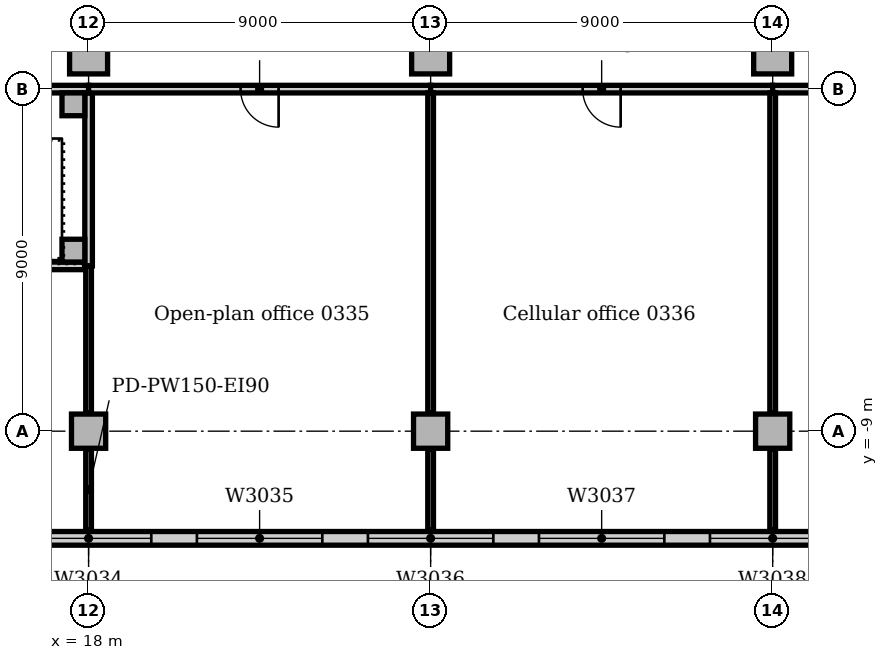
"""IFC4 building model, lengths in metres.
Left out: names, types, materials, properties, quantities, classifications, styles, units other than length and angle.
Written with IfcOpenShell. Run it as: python <this file> out.ifc"""

import sys

from ifc_helpers import new_model, si_unit, direction, frame, frame_2d, origin, origin_2d, place, context, subcontext, project, spatial, rectangle, extrude, element, fill, save


model = new_model("IFC4")
c1 = context("Model", 3, precision=1e-05, world=origin(), true_north=direction((0.0, 1.0)))
c2 = subcontext(c1, "Body", "Model", "MODEL_VIEW")
j1 = project(units=[si_unit("LENGTHUNIT", "METRE"), si_unit("PLANEANGLEUNIT", "RADIAN")], contexts=[c1])
p1 = place(None, origin())
s1 = spatial("IfcSite", under=j1, at=p1, CompositionType="ELEMENT")
p2 = place(p1, origin())
s2 = spatial("IfcBuilding", under=s1, at=p2, CompositionType="ELEMENT")
p3 = place(p2, frame((0.0, 0.0, 16.0)))
s3 = spatial("IfcBuildingStorey", under=s2, at=p3, CompositionType="ELEMENT", Elevation=16.0)
for number, where, z_axis, x_axis in (
    (1, (18.0, 0.9, 0.0), (0.0, 0.0, 1.0), (1.0, 0.0, 0.0)),
    (2, (27.0, 0.9, 0.0), (0.0, 0.0, 1.0), (1.0, 0.0, 0.0)),
    (3, (36.0, 0.9, 0.0), (0.0, 0.0, 1.0), (1.0, 0.0, 0.0)),
):
    element("IfcColumn", number, at=place(p3, frame(where, z_axis=z_axis, x_axis=x_axis)), inside=s3, PredefinedType="COLUMN", context=c2, shape_type="SweptSolid", body=[
        extrude(rectangle(XDim=1.0, YDim=1.0, at=origin_2d()), origin(), (0.0, 0.0, 1.0), 4.7),
    ])
for number, where, z_axis, x_axis in (
    (4, (18.0, -9.0, 0.0), (0.0, 0.0, 1.0), (1.0, 0.0, 0.0)),
    (5, (27.0, -9.0, 0.0), (0.0, 0.0, 1.0), (1.0, 0.0, 0.0)),
    (6, (36.0, -9.0, 0.0), (0.0, 0.0, 1.0), (1.0, 0.0, 0.0)),
):
    element("IfcColumn", number, at=place(p3, frame(where, z_axis=z_axis, x_axis=x_axis)), inside=s3, PredefinedType="COLUMN", context=c2, shape_type="SweptSolid", body=[
        extrude(rectangle(XDim=0.9, YDim=0.9, at=origin_2d()), origin(), (0.0, 0.0, 1.0), 4.7),
    ])
p4 = place(p3, frame((-81.0, -11.82, 0.0), z_axis=(0.0, 0.0, 1.0), x_axis=(1.0, 0.0, 0.0)))
e7 = element("IfcWall", 7, at=p4, inside=s3, PredefinedType="STANDARD", context=c2, shape_type="SweptSolid", body=[
    extrude(rectangle(XDim=144.0, YDim=0.36, at=frame_2d((72.0, 0.0))), origin(), (0.0, 0.0, 1.0), 4.7),
])
p5 = place(p4, frame((2.85, 0.0, 0.9)))
e8 = element("IfcOpeningElement", 8, at=p5, cuts=e7, PredefinedType="OPENING", context=c2, shape_type="SweptSolid", body=[
    extrude(rectangle(XDim=3.3, YDim=2.4, at=frame_2d((1.65, 1.2))), frame((0.0, 0.19, 0.0), z_axis=(0.0, -1.0, 0.0), x_axis=(1.0, 0.0, 0.0)), (0.0, 0.0, 1.0), 0.38),
])
p6 = place(p4, frame((7.35, 0.0, 0.9)))
e9 = element("IfcOpeningElement", 9, at=p6, cuts=e7, PredefinedType="OPENING", context=c2, shape_type="SweptSolid", body=[
    extrude(rectangle(XDim=3.3, YDim=2.4, at=frame_2d((1.65, 1.2))), frame((0.0, 0.19, 0.0), z_axis=(0.0, -1.0, 0.0), x_axis=(1.0, 0.0, 0.0)), (0.0, 0.0, 1.0), 0.38),
])
p7 = place(p4, frame((11.85, 0.0, 0.9)))
e10 = element("IfcOpeningElement", 10, at=p7, cuts=e7, PredefinedType="OPENING", context=c2, shape_type="SweptSolid", body=[
    extrude(rectangle(XDim=3.3, YDim=2.4, at=frame_2d((1.65, 1.2))), frame((0.0, 0.19, 0.0), z_axis=(0.0, -1.0, 0.0), x_axis=(1.0, 0.0, 0.0)), (0.0, 0.0, 1.0), 0.38),
])
p8 = place(p4, frame((16.35, 0.0, 0.9)))
e11 = element("IfcOpeningElement", 11, at=p8, cuts=e7, PredefinedType="OPENING", context=c2, shape_type="SweptSolid", body=[
    extrude(rectangle(XDim=3.3, YDim=2.4, at=frame_2d((1.65, 1.2))), frame((0.0, 0.19, 0.0), z_axis=(0.0, -1.0, 0.0), x_axis=(1.0, 0.0, 0.0)), (0.0, 0.0, 1.0), 0.38),
])
p9 = place(p4, frame((20.85, 0.0, 0.9)))
e12 = element("IfcOpeningElement", 12, at=p9, cuts=e7, PredefinedType="OPENING", context=c2, shape_type="SweptSolid", body=[
    extrude(rectangle(XDim=3.3, YDim=2.4, at=frame_2d((1.65, 1.2))), frame((0.0, 0.19, 0.0), z_axis=(0.0, -1.0, 0.0), x_axis=(1.0, 0.0, 0.0)), (0.0, 0.0, 1.0), 0.38),
])
p10 = place(p4, frame((25.35, 0.0, 0.9)))
e13 = element("IfcOpeningElement", 13, at=p10, cuts=e7, PredefinedType="OPENING", context=c2, shape_type="SweptSolid", body=[
    extrude(rectangle(XDim=3.3, YDim=2.4, at=frame_2d((1.65, 1.2))), frame((0.0, 0.19, 0.0), z_axis=(0.0, -1.0, 0.0), x_axis=(1.0, 0.0, 0.0)), (0.0, 0.0, 1.0), 0.38),
])
p11 = place(p4, frame((29.85, 0.0, 0.9)))
e14 = element("IfcOpeningElement", 14, at=p11, cuts=e7, PredefinedType="OPENING", context=c2, shape_type="SweptSolid", body=[
    extrude(rectangle(XDim=3.3, YDim=2.4, at=frame_2d((1.65, 1.2))), frame((0.0, 0.19, 0.0), z_axis=(0.0, -1.0, 0.0), x_axis=(1.0, 0.0, 0.0)), (0.0, 0.0, 1.0), 0.38),
])
p12 = place(p4, frame((34.35, 0.0, 0.9)))
e15 = element("IfcOpeningElement", 15, at=p12, cuts=e7, PredefinedType="OPENING", context=c2, shape_type="SweptSolid", body=[
    extrude(rectangle(XDim=3.3, YDim=2.4, at=frame_2d((1.65, 1.2))), frame((0.0, 0.19, 0.0), z_axis=(0.0, -1.0, 0.0), x_axis=(1.0, 0.0, 0.0)), (0.0, 0.0, 1.0), 0.38),
])
p13 = place(p4, frame((38.85, 0.0, 0.9)))
e16 = element("IfcOpeningElement", 16, at=p13, cuts=e7, PredefinedType="OPENING", context=c2, shape_type="SweptSolid", body=[
    extrude(rectangle(XDim=3.3, YDim=2.4, at=frame_2d((1.65, 1.2))), frame((0.0, 0.19, 0.0), z_axis=(0.0, -1.0, 0.0), x_axis=(1.0, 0.0, 0.0)), (0.0, 0.0, 1.0), 0.38),
])
p14 = place(p4, frame((43.35, 0.0, 0.9)))
e17 = element("IfcOpeningElement", 17, at=p14, cuts=e7, PredefinedType="OPENING", context=c2, shape_type="SweptSolid", body=[
    extrude(rectangle(XDim=3.3, YDim=2.4, at=frame_2d((1.65, 1.2))), frame((0.0, 0.19, 0.0), z_axis=(0.0, -1.0, 0.0), x_axis=(1.0, 0.0, 0.0)), (0.0, 0.0, 1.0), 0.38),
])
p15 = place(p4, frame((47.85, 0.0, 0.9)))
e18 = element("IfcOpeningElement", 18, at=p15, cuts=e7, PredefinedType="OPENING", context=c2, shape_type="SweptSolid", body=[
    extrude(rectangle(XDim=3.3, YDim=2.4, at=frame_2d((1.65, 1.2))), frame((0.0, 0.19, 0.0), z_axis=(0.0, -1.0, 0.0), x_axis=(1.0, 0.0, 0.0)), (0.0, 0.0, 1.0), 0.38),
])
p16 = place(p4, frame((52.35, 0.0, 0.9)))
e19 = element("IfcOpeningElement", 19, at=p16, cuts=e7, PredefinedType="OPENING", context=c2, shape_type="SweptSolid", body=[
    extrude(rectangle(XDim=3.3, YDim=2.4, at=frame_2d((1.65, 1.2))), frame((0.0, 0.19, 0.0), z_axis=(0.0, -1.0, 0.0), x_axis=(1.0, 0.0, 0.0)), (0.0, 0.0, 1.0), 0.38),
])
p17 = place(p4, frame((56.85, 0.0, 0.9)))
e20 = element("IfcOpeningElement", 20, at=p17, cuts=e7, PredefinedType="OPENING", context=c2, shape_type="SweptSolid", body=[
    extrude(rectangle(XDim=3.3, YDim=2.4, at=frame_2d((1.65, 1.2))), frame((0.0, 0.19, 0.0), z_axis=(0.0, -1.0, 0.0), x_axis=(1.0, 0.0, 0.0)), (0.0, 0.0, 1.0), 0.38),
])
p18 = place(p4, frame((61.35, 0.0, 0.9)))
e21 = element("IfcOpeningElement", 21, at=p18, cuts=e7, PredefinedType="OPENING", context=c2, shape_type="SweptSolid", body=[
    extrude(rectangle(XDim=3.3, YDim=2.4, at=frame_2d((1.65, 1.2))), frame((0.0, 0.19, 0.0), z_axis=(0.0, -1.0, 0.0), x_axis=(1.0, 0.0, 0.0)), (0.0, 0.0, 1.0), 0.38),
])
p19 = place(p4, frame((65.85, 0.0, 0.9)))
e22 = element("IfcOpeningElement", 22, at=p19, cuts=e7, PredefinedType="OPENING", context=c2, shape_type="SweptSolid", body=[
    extrude(rectangle(XDim=3.3, YDim=2.4, at=frame_2d((1.65, 1.2))), frame((0.0, 0.19, 0.0), z_axis=(0.0, -1.0, 0.0), x_axis=(1.0, 0.0, 0.0)), (0.0, 0.0, 1.0), 0.38),
])
p20 = place(p4, frame((70.35, 0.0, 0.9)))
e23 = element("IfcOpeningElement", 23, at=p20, cuts=e7, PredefinedType="OPENING", context=c2, shape_type="SweptSolid", body=[
    extrude(rectangle(XDim=3.3, YDim=2.4, at=frame_2d((1.65, 1.2))), frame((0.0, 0.19, 0.0), z_axis=(0.0, -1.0, 0.0), x_axis=(1.0, 0.0, 0.0)), (0.0, 0.0, 1.0), 0.38),
])
p21 = place(p4, frame((74.85, 0.0, 0.9)))
e24 = element("IfcOpeningElement", 24, at=p21, cuts=e7, PredefinedType="OPENING", context=c2, shape_type="SweptSolid", body=[
    extrude(rectangle(XDim=3.3, YDim=2.4, at=frame_2d((1.65, 1.2))), frame((0.0, 0.19, 0.0), z_axis=(0.0, -1.0, 0.0), x_axis=(1.0, 0.0, 0.0)), (0.0, 0.0, 1.0), 0.38),
])
p22 = place(p4, frame((79.35, 0.0, 0.9)))
e25 = element("IfcOpeningElement", 25, at=p22, cuts=e7, PredefinedType="OPENING", context=c2, shape_type="SweptSolid", body=[
    extrude(rectangle(XDim=3.3, YDim=2.4, at=frame_2d((1.65, 1.2))), frame((0.0, 0.19, 0.0), z_axis=(0.0, -1.0, 0.0), x_axis=(1.0, 0.0, 0.0)), (0.0, 0.0, 1.0), 0.38),
])
p23 = place(p4, frame((83.85, 0.0, 0.9)))
e26 = element("IfcOpeningElement", 26, at=p23, cuts=e7, PredefinedType="OPENING", context=c2, shape_type="SweptSolid", body=[
    extrude(rectangle(XDim=3.3, YDim=2.4, at=frame_2d((1.65, 1.2))), frame((0.0, 0.19, 0.0), z_axis=(0.0, -1.0, 0.0), x_axis=(1.0, 0.0, 0.0)), (0.0, 0.0, 1.0), 0.38),
])
p24 = place(p4, frame((88.35, 0.0, 0.9)))
e27 = element("IfcOpeningElement", 27, at=p24, cuts=e7, PredefinedType="OPENING", context=c2, shape_type="SweptSolid", body=[
    extrude(rectangle(XDim=3.3, YDim=2.4, at=frame_2d((1.65, 1.2))), frame((0.0, 0.19, 0.0), z_axis=(0.0, -1.0, 0.0), x_axis=(1.0, 0.0, 0.0)), (0.0, 0.0, 1.0), 0.38),
])
p25 = place(p4, frame((92.85, 0.0, 0.9)))
e28 = element("IfcOpeningElement", 28, at=p25, cuts=e7, PredefinedType="OPENING", context=c2, shape_type="SweptSolid", body=[
    extrude(rectangle(XDim=3.3, YDim=2.4, at=frame_2d((1.65, 1.2))), frame((0.0, 0.19, 0.0), z_axis=(0.0, -1.0, 0.0), x_axis=(1.0, 0.0, 0.0)), (0.0, 0.0, 1.0), 0.38),
])
p26 = place(p4, frame((97.35, 0.0, 0.9)))
e29 = element("IfcOpeningElement", 29, at=p26, cuts=e7, PredefinedType="OPENING", context=c2, shape_type="SweptSolid", body=[
    extrude(rectangle(XDim=3.3, YDim=2.4, at=frame_2d((1.65, 1.2))), frame((0.0, 0.19, 0.0), z_axis=(0.0, -1.0, 0.0), x_axis=(1.0, 0.0, 0.0)), (0.0, 0.0, 1.0), 0.38),
])
p27 = place(p4, frame((101.85, 0.0, 0.9)))
e30 = element("IfcOpeningElement", 30, at=p27, cuts=e7, PredefinedType="OPENING", context=c2, shape_type="SweptSolid", body=[
    extrude(rectangle(XDim=3.3, YDim=2.4, at=frame_2d((1.65, 1.2))), frame((0.0, 0.19, 0.0), z_axis=(0.0, -1.0, 0.0), x_axis=(1.0, 0.0, 0.0)), (0.0, 0.0, 1.0), 0.38),
])
p28 = place(p4, frame((106.35, 0.0, 0.9)))
e31 = element("IfcOpeningElement", 31, at=p28, cuts=e7, PredefinedType="OPENING", context=c2, shape_type="SweptSolid", body=[
    extrude(rectangle(XDim=3.3, YDim=2.4, at=frame_2d((1.65, 1.2))), frame((0.0, 0.19, 0.0), z_axis=(0.0, -1.0, 0.0), x_axis=(1.0, 0.0, 0.0)), (0.0, 0.0, 1.0), 0.38),
])
p29 = place(p4, frame((110.85, 0.0, 0.9)))
e32 = element("IfcOpeningElement", 32, at=p29, cuts=e7, PredefinedType="OPENING", context=c2, shape_type="SweptSolid", body=[
    extrude(rectangle(XDim=3.3, YDim=2.4, at=frame_2d((1.65, 1.2))), frame((0.0, 0.19, 0.0), z_axis=(0.0, -1.0, 0.0), x_axis=(1.0, 0.0, 0.0)), (0.0, 0.0, 1.0), 0.38),
])
p30 = place(p4, frame((115.35, 0.0, 0.9)))
e33 = element("IfcOpeningElement", 33, at=p30, cuts=e7, PredefinedType="OPENING", context=c2, shape_type="SweptSolid", body=[
    extrude(rectangle(XDim=3.3, YDim=2.4, at=frame_2d((1.65, 1.2))), frame((0.0, 0.19, 0.0), z_axis=(0.0, -1.0, 0.0), x_axis=(1.0, 0.0, 0.0)), (0.0, 0.0, 1.0), 0.38),
])
p31 = place(p4, frame((119.85, 0.0, 0.9)))
e34 = element("IfcOpeningElement", 34, at=p31, cuts=e7, PredefinedType="OPENING", context=c2, shape_type="SweptSolid", body=[
    extrude(rectangle(XDim=3.3, YDim=2.4, at=frame_2d((1.65, 1.2))), frame((0.0, 0.19, 0.0), z_axis=(0.0, -1.0, 0.0), x_axis=(1.0, 0.0, 0.0)), (0.0, 0.0, 1.0), 0.38),
])
p32 = place(p4, frame((124.35, 0.0, 0.9)))
e35 = element("IfcOpeningElement", 35, at=p32, cuts=e7, PredefinedType="OPENING", context=c2, shape_type="SweptSolid", body=[
    extrude(rectangle(XDim=3.3, YDim=2.4, at=frame_2d((1.65, 1.2))), frame((0.0, 0.19, 0.0), z_axis=(0.0, -1.0, 0.0), x_axis=(1.0, 0.0, 0.0)), (0.0, 0.0, 1.0), 0.38),
])
p33 = place(p4, frame((128.85, 0.0, 0.9)))
e36 = element("IfcOpeningElement", 36, at=p33, cuts=e7, PredefinedType="OPENING", context=c2, shape_type="SweptSolid", body=[
    extrude(rectangle(XDim=3.3, YDim=2.4, at=frame_2d((1.65, 1.2))), frame((0.0, 0.19, 0.0), z_axis=(0.0, -1.0, 0.0), x_axis=(1.0, 0.0, 0.0)), (0.0, 0.0, 1.0), 0.38),
])
p34 = place(p4, frame((133.35, 0.0, 0.9)))
e37 = element("IfcOpeningElement", 37, at=p34, cuts=e7, PredefinedType="OPENING", context=c2, shape_type="SweptSolid", body=[
    extrude(rectangle(XDim=3.3, YDim=2.4, at=frame_2d((1.65, 1.2))), frame((0.0, 0.19, 0.0), z_axis=(0.0, -1.0, 0.0), x_axis=(1.0, 0.0, 0.0)), (0.0, 0.0, 1.0), 0.38),
])
p35 = place(p4, frame((137.85, 0.0, 0.9)))
e38 = element("IfcOpeningElement", 38, at=p35, cuts=e7, PredefinedType="OPENING", context=c2, shape_type="SweptSolid", body=[
    extrude(rectangle(XDim=3.3, YDim=2.4, at=frame_2d((1.65, 1.2))), frame((0.0, 0.19, 0.0), z_axis=(0.0, -1.0, 0.0), x_axis=(1.0, 0.0, 0.0)), (0.0, 0.0, 1.0), 0.38),
])
for number, where, z_axis, x_axis in (
    (39, (17.6, -4.25, 0.0), (0.0, 0.0, 1.0), (1.0, 0.0, 0.0)),
    (40, (17.6, -0.4, 0.0), (0.0, 0.0, 1.0), (1.0, 0.0, 0.0)),
):
    element("IfcColumn", number, at=place(p3, frame(where, z_axis=z_axis, x_axis=x_axis)), inside=s3, PredefinedType="COLUMN", context=c2, shape_type="SweptSolid", body=[
        extrude(rectangle(XDim=0.6, YDim=0.6, at=origin_2d()), origin(), (0.0, 0.0, 1.0), 5.0),
    ])
p36 = place(p3, frame((9.0, 0.0, 0.0), z_axis=(0.0, 0.0, 1.0), x_axis=(1.0, 0.0, 0.0)))
e41 = element("IfcWall", 41, at=p36, inside=s3, PredefinedType="SOLIDWALL", context=c2, shape_type="SweptSolid", body=[
    extrude(rectangle(XDim=9.0, YDim=0.2, at=frame_2d((4.5, 0.0))), origin(), (0.0, 0.0, 1.0), 4.7),
])
p37 = place(p36, frame((0.8, 0.0, 0.0)))
e42 = element("IfcOpeningElement", 42, at=p37, cuts=e41, PredefinedType="OPENING", context=c2, shape_type="SweptSolid", body=[
    extrude(rectangle(XDim=1.2, YDim=2.1, at=frame_2d((0.6, 1.05))), frame((0.0, 0.11, 0.0), z_axis=(0.0, -1.0, 0.0), x_axis=(1.0, 0.0, 0.0)), (0.0, 0.0, 1.0), 0.22),
])
p38 = place(p3, frame((8.9, -4.65, 0.0), z_axis=(0.0, 0.0, 1.0), x_axis=(1.0, 0.0, 0.0)))
e43 = element("IfcWall", 43, at=p38, inside=s3, PredefinedType="SOLIDWALL", context=c2, shape_type="SweptSolid", body=[
    extrude(rectangle(XDim=9.0, YDim=0.2, at=frame_2d((4.5, 0.0))), origin(), (0.0, 0.0, 1.0), 4.7),
])
p39 = place(p3, frame((18.0, -4.65, 0.0), z_axis=(0.0, 0.0, 1.0), x_axis=(0.0, 1.0, 0.0)))
e44 = element("IfcWall", 44, at=p39, inside=s3, PredefinedType="SOLIDWALL", context=c2, shape_type="SweptSolid", body=[
    extrude(rectangle(XDim=4.55, YDim=0.2, at=frame_2d((2.275, 0.0))), origin(), (0.0, 0.0, 1.0), 4.7),
])
p40 = place(p3, frame((18.0, 0.0, 0.0), z_axis=(0.0, 0.0, 1.0), x_axis=(1.0, 0.0, 0.0)))
e45 = element("IfcWall", 45, at=p40, inside=s3, PredefinedType="PARTITIONING", context=c2, shape_type="SweptSolid", body=[
    extrude(rectangle(XDim=9.0, YDim=0.2, at=frame_2d((4.5, 0.0))), origin(), (0.0, 0.0, 1.0), 4.7),
])
p41 = place(p40, frame((4.0, 0.0, 0.0)))
e46 = element("IfcOpeningElement", 46, at=p41, cuts=e45, PredefinedType="OPENING", context=c2, shape_type="SweptSolid", body=[
    extrude(rectangle(XDim=1.0, YDim=2.1, at=frame_2d((0.5, 1.05))), frame((0.0, 0.11, 0.0), z_axis=(0.0, -1.0, 0.0), x_axis=(1.0, 0.0, 0.0)), (0.0, 0.0, 1.0), 0.22),
])
p42 = place(p3, frame((27.0, 0.0, 0.0), z_axis=(0.0, 0.0, 1.0), x_axis=(1.0, 0.0, 0.0)))
e47 = element("IfcWall", 47, at=p42, inside=s3, PredefinedType="PARTITIONING", context=c2, shape_type="SweptSolid", body=[
    extrude(rectangle(XDim=9.0, YDim=0.2, at=frame_2d((4.5, 0.0))), origin(), (0.0, 0.0, 1.0), 4.7),
])
p43 = place(p42, frame((4.0, 0.0, 0.0)))
e48 = element("IfcOpeningElement", 48, at=p43, cuts=e47, PredefinedType="OPENING", context=c2, shape_type="SweptSolid", body=[
    extrude(rectangle(XDim=1.0, YDim=2.1, at=frame_2d((0.5, 1.05))), frame((0.0, 0.11, 0.0), z_axis=(0.0, -1.0, 0.0), x_axis=(1.0, 0.0, 0.0)), (0.0, 0.0, 1.0), 0.22),
])
p44 = place(p3, frame((36.0, 0.0, 0.0), z_axis=(0.0, 0.0, 1.0), x_axis=(1.0, 0.0, 0.0)))
e49 = element("IfcWall", 49, at=p44, inside=s3, PredefinedType="PARTITIONING", context=c2, shape_type="SweptSolid", body=[
    extrude(rectangle(XDim=9.0, YDim=0.2, at=frame_2d((4.5, 0.0))), origin(), (0.0, 0.0, 1.0), 4.7),
])
p45 = place(p44, frame((4.0, 0.0, 0.0)))
e50 = element("IfcOpeningElement", 50, at=p45, cuts=e49, PredefinedType="OPENING", context=c2, shape_type="SweptSolid", body=[
    extrude(rectangle(XDim=1.0, YDim=2.1, at=frame_2d((0.5, 1.05))), frame((0.0, 0.11, 0.0), z_axis=(0.0, -1.0, 0.0), x_axis=(1.0, 0.0, 0.0)), (0.0, 0.0, 1.0), 0.22),
])
p46 = place(p3, frame((18.0, -11.6, 0.0), z_axis=(0.0, 0.0, 1.0), x_axis=(0.0, 1.0, 0.0)))
e51 = element("IfcWall", 51, at=p46, inside=s3, PredefinedType="PARTITIONING", context=c2, shape_type="SweptSolid", body=[
    extrude(rectangle(XDim=2.13, YDim=0.15, at=frame_2d((1.065, 0.0))), origin(), (0.0, 0.0, 1.0), 4.7),
])
p47 = place(p3, frame((18.0, -8.53, 0.0), z_axis=(0.0, 0.0, 1.0), x_axis=(0.0, 1.0, 0.0)))
e52 = element("IfcWall", 52, at=p47, inside=s3, PredefinedType="PARTITIONING", context=c2, shape_type="SweptSolid", body=[
    extrude(rectangle(XDim=3.88, YDim=0.15, at=frame_2d((1.94, 0.0))), origin(), (0.0, 0.0, 1.0), 4.7),
])
p48 = place(p3, frame((27.0, -11.6, 0.0), z_axis=(0.0, 0.0, 1.0), x_axis=(0.0, 1.0, 0.0)))
e53 = element("IfcWall", 53, at=p48, inside=s3, PredefinedType="PARTITIONING", context=c2, shape_type="SweptSolid", body=[
    extrude(rectangle(XDim=2.13, YDim=0.15, at=frame_2d((1.065, 0.0))), origin(), (0.0, 0.0, 1.0), 4.7),
])
p49 = place(p3, frame((27.0, -8.53, 0.0), z_axis=(0.0, 0.0, 1.0), x_axis=(0.0, 1.0, 0.0)))
e54 = element("IfcWall", 54, at=p49, inside=s3, PredefinedType="PARTITIONING", context=c2, shape_type="SweptSolid", body=[
    extrude(rectangle(XDim=8.43, YDim=0.15, at=frame_2d((4.215, 0.0))), origin(), (0.0, 0.0, 1.0), 4.7),
])
p50 = place(p3, frame((36.0, -11.6, 0.0), z_axis=(0.0, 0.0, 1.0), x_axis=(0.0, 1.0, 0.0)))
e55 = element("IfcWall", 55, at=p50, inside=s3, PredefinedType="PARTITIONING", context=c2, shape_type="SweptSolid", body=[
    extrude(rectangle(XDim=2.13, YDim=0.15, at=frame_2d((1.065, 0.0))), origin(), (0.0, 0.0, 1.0), 4.7),
])
p51 = place(p3, frame((36.0, -8.53, 0.0), z_axis=(0.0, 0.0, 1.0), x_axis=(0.0, 1.0, 0.0)))
e56 = element("IfcWall", 56, at=p51, inside=s3, PredefinedType="PARTITIONING", context=c2, shape_type="SweptSolid", body=[
    extrude(rectangle(XDim=8.43, YDim=0.15, at=frame_2d((4.215, 0.0))), origin(), (0.0, 0.0, 1.0), 4.7),
])
p52 = place(p26, origin())
e57 = element("IfcWindow", 57, at=p52, inside=s3, PartitioningType="SINGLE_PANEL", PredefinedType="WINDOW", context=c2, shape_type="SweptSolid", body=[
    extrude(rectangle(XDim=3.3, YDim=2.4, at=frame_2d((1.65, 1.2))), frame((0.0, 0.13, 0.0), z_axis=(0.0, -1.0, 0.0), x_axis=(1.0, 0.0, 0.0)), (0.0, 0.0, 1.0), 0.06),
])
fill(e29, e57)
p53 = place(p27, origin())
e58 = element("IfcWindow", 58, at=p53, inside=s3, PartitioningType="SINGLE_PANEL", PredefinedType="WINDOW", context=c2, shape_type="SweptSolid", body=[
    extrude(rectangle(XDim=3.3, YDim=2.4, at=frame_2d((1.65, 1.2))), frame((0.0, 0.13, 0.0), z_axis=(0.0, -1.0, 0.0), x_axis=(1.0, 0.0, 0.0)), (0.0, 0.0, 1.0), 0.06),
])
fill(e30, e58)
p54 = place(p28, origin())
e59 = element("IfcWindow", 59, at=p54, inside=s3, PartitioningType="SINGLE_PANEL", PredefinedType="WINDOW", context=c2, shape_type="SweptSolid", body=[
    extrude(rectangle(XDim=3.3, YDim=2.4, at=frame_2d((1.65, 1.2))), frame((0.0, 0.13, 0.0), z_axis=(0.0, -1.0, 0.0), x_axis=(1.0, 0.0, 0.0)), (0.0, 0.0, 1.0), 0.06),
])
fill(e31, e59)
p55 = place(p29, origin())
e60 = element("IfcWindow", 60, at=p55, inside=s3, PartitioningType="SINGLE_PANEL", PredefinedType="WINDOW", context=c2, shape_type="SweptSolid", body=[
    extrude(rectangle(XDim=3.3, YDim=2.4, at=frame_2d((1.65, 1.2))), frame((0.0, 0.13, 0.0), z_axis=(0.0, -1.0, 0.0), x_axis=(1.0, 0.0, 0.0)), (0.0, 0.0, 1.0), 0.06),
])
fill(e32, e60)
p56 = place(p30, origin())
e61 = element("IfcWindow", 61, at=p56, inside=s3, PartitioningType="SINGLE_PANEL", PredefinedType="WINDOW", context=c2, shape_type="SweptSolid", body=[
    extrude(rectangle(XDim=3.3, YDim=2.4, at=frame_2d((1.65, 1.2))), frame((0.0, 0.13, 0.0), z_axis=(0.0, -1.0, 0.0), x_axis=(1.0, 0.0, 0.0)), (0.0, 0.0, 1.0), 0.06),
])
fill(e33, e61)
p57 = place(p41, frame((1.0, 0.0, 0.0), z_axis=(0.0, 0.0, 1.0), x_axis=(-1.0, 0.0, 0.0)))
e62 = element("IfcDoor", 62, at=p57, inside=s3, OperationType="SINGLE_SWING_LEFT", PredefinedType="DOOR", context=c2, shape_type="SweptSolid", body=[
    extrude(rectangle(XDim=1.0, YDim=2.1, at=frame_2d((0.5, 1.05))), frame((0.0, 0.025, 0.0), z_axis=(0.0, -1.0, 0.0), x_axis=(1.0, 0.0, 0.0)), (0.0, 0.0, 1.0), 0.05),
])
fill(e46, e62)
p58 = place(p43, frame((1.0, 0.0, 0.0), z_axis=(0.0, 0.0, 1.0), x_axis=(-1.0, 0.0, 0.0)))
e63 = element("IfcDoor", 63, at=p58, inside=s3, OperationType="SINGLE_SWING_LEFT", PredefinedType="DOOR", context=c2, shape_type="SweptSolid", body=[
    extrude(rectangle(XDim=1.0, YDim=2.1, at=frame_2d((0.5, 1.05))), frame((0.0, 0.025, 0.0), z_axis=(0.0, -1.0, 0.0), x_axis=(1.0, 0.0, 0.0)), (0.0, 0.0, 1.0), 0.05),
])
fill(e48, e63)
save(model, sys.argv[1])
